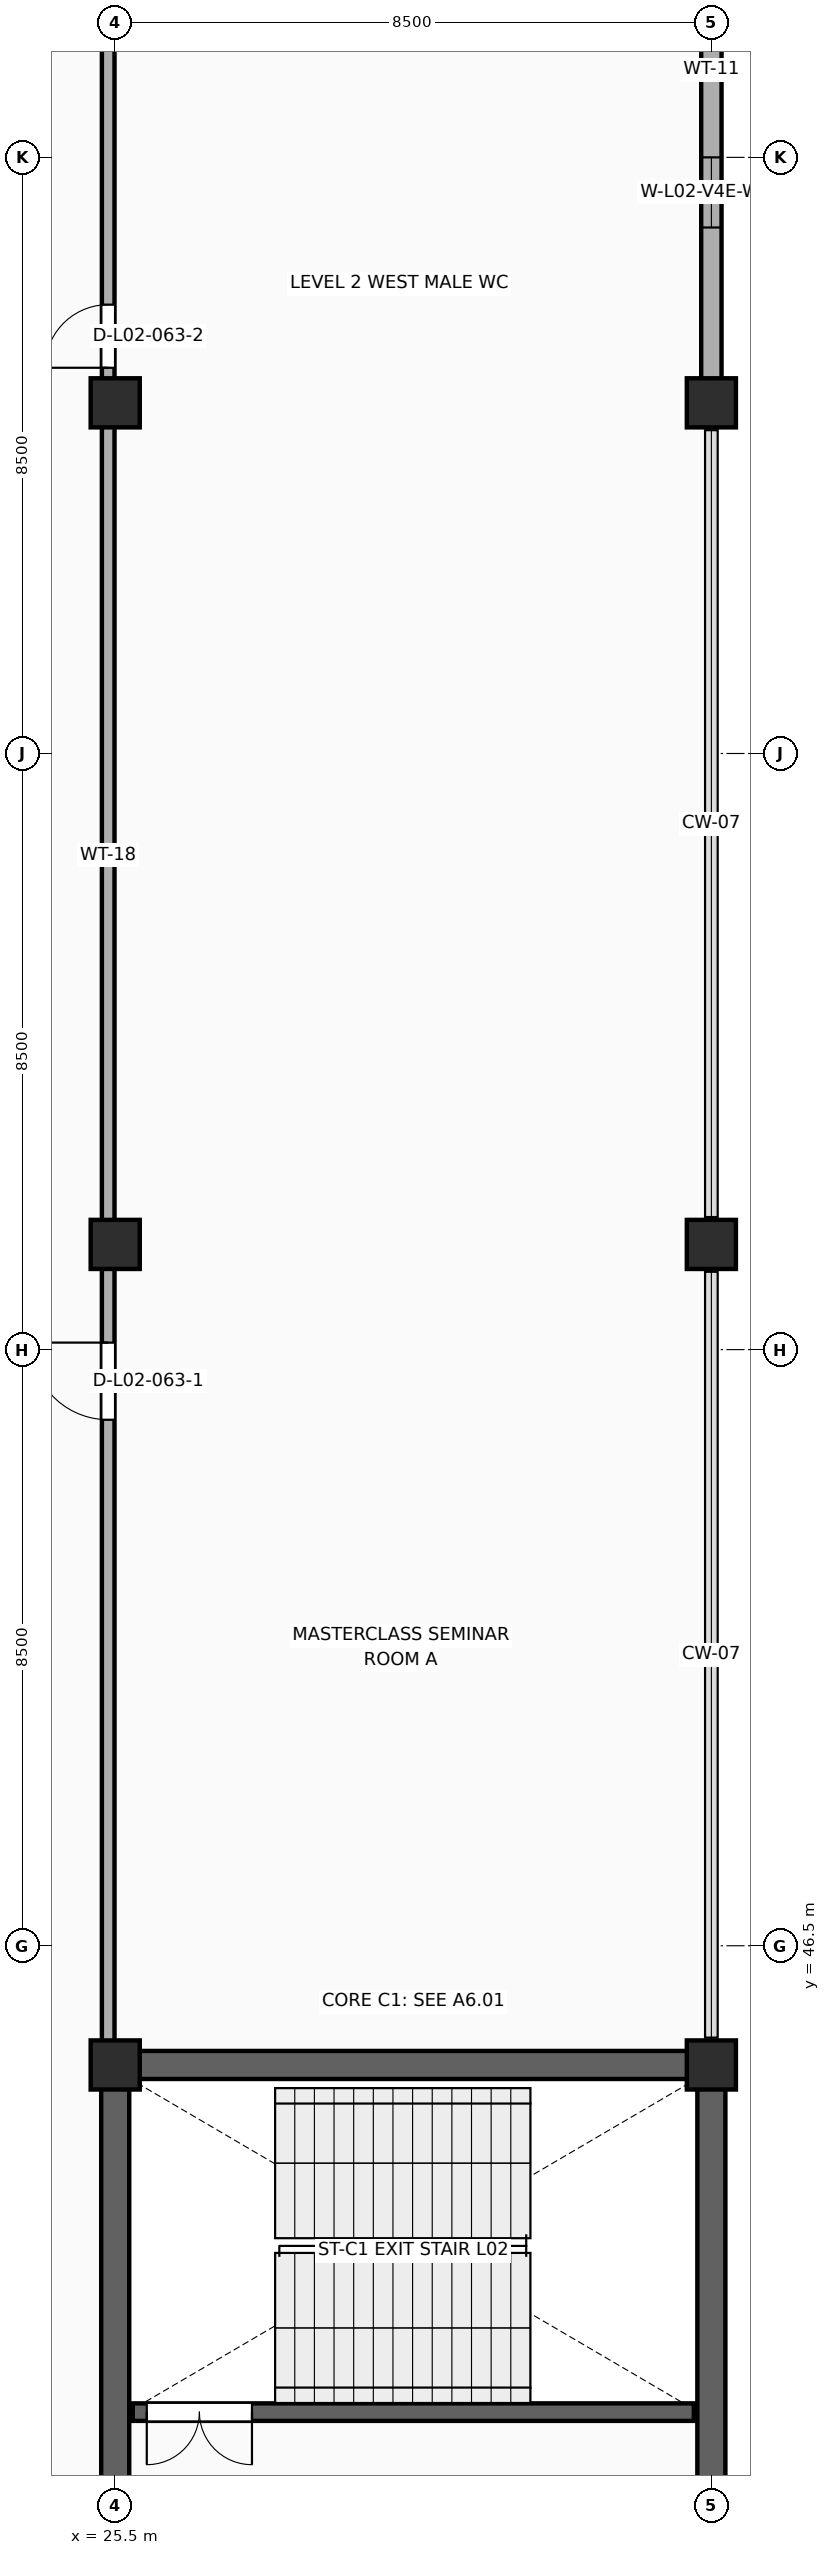
"""IFC4 building model, lengths in metres.
Left out: names, types, materials, properties, quantities, classifications, styles, units other than length and angle.
Written with IfcOpenShell. Run it as: python <this file> out.ifc"""

import sys

from ifc_helpers import new_model, si_unit, direction, frame, frame_2d, origin, origin_2d, place, context, subcontext, project, spatial, rectangle, extrude, element, fill, save


model = new_model("IFC4")
c1 = context("Model", 3, precision=1e-05, world=origin(), true_north=direction((0.0, 1.0)))
c2 = subcontext(c1, "Body", "Model", "MODEL_VIEW")
j1 = project(units=[si_unit("LENGTHUNIT", "METRE"), si_unit("PLANEANGLEUNIT", "RADIAN")], contexts=[c1])
p1 = place(None, origin())
s1 = spatial("IfcSite", under=j1, at=p1, CompositionType="ELEMENT")
p2 = place(p1, origin())
s2 = spatial("IfcBuilding", under=s1, at=p2, CompositionType="ELEMENT")
p3 = place(p2, frame((0.0, 0.0, 10.2)))
s3 = spatial("IfcBuildingStorey", under=s2, at=p3, CompositionType="ELEMENT", Elevation=10.2)
p4 = place(p3, frame((25.5, 32.0, 0.0), z_axis=(0.0, 0.0, 1.0), x_axis=(0.0, 1.0, 0.0)))
e1 = element("IfcWall", 1, at=p4, inside=s3, PredefinedType="SHEAR", context=c2, shape_type="SweptSolid", body=[
    extrude(rectangle(XDim=12.8, YDim=0.4, at=frame_2d((6.4, 0.0))), origin(), (0.0, 0.0, 1.0), 4.64),
])
p5 = place(p4, frame((1.25, 0.0, 0.0)))
e2 = element("IfcOpeningElement", 2, at=p5, cuts=e1, PredefinedType="OPENING", context=c2, shape_type="SweptSolid", body=[
    extrude(rectangle(XDim=1.05, YDim=2.15, at=frame_2d((0.525, 1.075))), frame((0.0, 0.212, 0.0), z_axis=(0.0, -1.0, 0.0), x_axis=(1.0, 0.0, 0.0)), (0.0, 0.0, 1.0), 0.424),
])
p6 = place(p3, frame((34.0, 32.0, 0.0), z_axis=(0.0, 0.0, 1.0), x_axis=(0.0, 1.0, 0.0)))
e3 = element("IfcWall", 3, at=p6, inside=s3, PredefinedType="SHEAR", context=c2, shape_type="SweptSolid", body=[
    extrude(rectangle(XDim=12.8, YDim=0.4, at=frame_2d((6.4, 0.0))), origin(), (0.0, 0.0, 1.0), 4.64),
])
p7 = place(p3, frame((25.7, 44.8, 0.0), z_axis=(0.0, 0.0, 1.0), x_axis=(1.0, 0.0, 0.0)))
e4 = element("IfcWall", 4, at=p7, inside=s3, PredefinedType="SHEAR", context=c2, shape_type="SweptSolid", body=[
    extrude(rectangle(XDim=8.1, YDim=0.4, at=frame_2d((4.05, 0.0))), origin(), (0.0, 0.0, 1.0), 4.64),
])
p8 = place(p3, frame((25.75, 39.85, 0.0), z_axis=(0.0, 0.0, 1.0), x_axis=(1.0, 0.0, 0.0)))
e5 = element("IfcWall", 5, at=p8, inside=s3, PredefinedType="STANDARD", context=c2, shape_type="SweptSolid", body=[
    extrude(rectangle(XDim=8.0, YDim=0.25, at=frame_2d((4.0, 0.0))), origin(), (0.0, 0.0, 1.0), 4.64),
])
p9 = place(p8, frame((0.2, 0.0, 0.0)))
e6 = element("IfcOpeningElement", 6, at=p9, cuts=e5, PredefinedType="OPENING", context=c2, shape_type="SweptSolid", body=[
    extrude(rectangle(XDim=1.5, YDim=2.2, at=frame_2d((0.75, 1.1))), frame((0.0, 0.137, 0.0), z_axis=(0.0, -1.0, 0.0), x_axis=(1.0, 0.0, 0.0)), (0.0, 0.0, 1.0), 0.274),
])
for number, where, z_axis, x_axis in (
    (7, (25.5, 44.8, 0.0), (0.0, 0.0, 1.0), (1.0, 0.0, 0.0)),
    (8, (25.5, 56.5, 0.0), (0.0, 0.0, 1.0), (1.0, 0.0, 0.0)),
    (9, (25.5, 68.5, 0.0), (0.0, 0.0, 1.0), (1.0, 0.0, 0.0)),
    (10, (34.0, 44.8, 0.0), (0.0, 0.0, 1.0), (1.0, 0.0, 0.0)),
    (11, (34.0, 56.5, 0.0), (0.0, 0.0, 1.0), (1.0, 0.0, 0.0)),
    (12, (34.0, 68.5, 0.0), (0.0, 0.0, 1.0), (1.0, 0.0, 0.0)),
):
    element("IfcColumn", number, at=place(p3, frame(where, z_axis=z_axis, x_axis=x_axis)), inside=s3, PredefinedType="COLUMN", context=c2, shape_type="SweptSolid", body=[
        extrude(rectangle(XDim=0.7, YDim=0.7, at=origin_2d()), origin(), (0.0, 0.0, 1.0), 4.54),
    ])
p10 = place(p3, frame((34.0, 68.5, 0.0), z_axis=(0.0, 0.0, 1.0), x_axis=(0.0, 1.0, 0.0)))
e13 = element("IfcWall", 13, at=p10, inside=s3, PredefinedType="STANDARD", context=c2, shape_type="SweptSolid", body=[
    extrude(rectangle(XDim=12.0, YDim=0.29, at=frame_2d((6.0, 0.0))), origin(), (0.0, 0.0, 1.0), 4.278),
])
p11 = place(p10, frame((2.5, 0.0, 1.1)))
e14 = element("IfcOpeningElement", 14, at=p11, cuts=e13, PredefinedType="OPENING", context=c2, shape_type="SweptSolid", body=[
    extrude(rectangle(XDim=1.0, YDim=1.5, at=frame_2d((0.5, 0.75))), frame((0.0, 0.157, 0.0), z_axis=(0.0, -1.0, 0.0), x_axis=(1.0, 0.0, 0.0)), (0.0, 0.0, 1.0), 0.314),
])
p12 = place(p3, frame((25.4, 45.0, 0.0), z_axis=(0.0, 0.0, 1.0), x_axis=(0.0, 1.0, 0.0)))
e15 = element("IfcWall", 15, at=p12, inside=s3, PredefinedType="PARTITIONING", context=c2, shape_type="SweptSolid", body=[
    extrude(rectangle(XDim=35.2, YDim=0.18, at=frame_2d((17.6, 0.0))), origin(), (0.0, 0.0, 1.0), 3.68),
])
p13 = place(p12, frame((9.0, 0.0, 0.0)))
e16 = element("IfcOpeningElement", 16, at=p13, cuts=e15, PredefinedType="OPENING", context=c2, shape_type="SweptSolid", body=[
    extrude(rectangle(XDim=1.1, YDim=2.15, at=frame_2d((0.55, 1.075))), frame((0.0, 0.102, 0.0), z_axis=(0.0, -1.0, 0.0), x_axis=(1.0, 0.0, 0.0)), (0.0, 0.0, 1.0), 0.204),
])
p14 = place(p12, frame((24.0, 0.0, 0.0)))
e17 = element("IfcOpeningElement", 17, at=p14, cuts=e15, PredefinedType="OPENING", context=c2, shape_type="SweptSolid", body=[
    extrude(rectangle(XDim=0.9, YDim=2.15, at=frame_2d((0.45, 1.075))), frame((0.0, 0.102, 0.0), z_axis=(0.0, -1.0, 0.0), x_axis=(1.0, 0.0, 0.0)), (0.0, 0.0, 1.0), 0.204),
])
p15 = place(p12, frame((28.8, 0.0, 0.0)))
e18 = element("IfcOpeningElement", 18, at=p15, cuts=e15, PredefinedType="OPENING", context=c2, shape_type="SweptSolid", body=[
    extrude(rectangle(XDim=0.9, YDim=2.15, at=frame_2d((0.45, 1.075))), frame((0.0, 0.102, 0.0), z_axis=(0.0, -1.0, 0.0), x_axis=(1.0, 0.0, 0.0)), (0.0, 0.0, 1.0), 0.204),
])
p16 = place(p12, frame((33.2, 0.0, 0.0)))
e19 = element("IfcOpeningElement", 19, at=p16, cuts=e15, PredefinedType="OPENING", context=c2, shape_type="SweptSolid", body=[
    extrude(rectangle(XDim=0.95, YDim=2.15, at=frame_2d((0.475, 1.075))), frame((0.0, 0.102, 0.0), z_axis=(0.0, -1.0, 0.0), x_axis=(1.0, 0.0, 0.0)), (0.0, 0.0, 1.0), 0.204),
])
p17 = place(p9, frame((1.5, 0.0, 0.0), z_axis=(0.0, 0.0, 1.0), x_axis=(-1.0, 0.0, 0.0)))
e20 = element("IfcDoor", 20, at=p17, inside=s3, OperationType="DOUBLE_DOOR_SINGLE_SWING", PredefinedType="DOOR", context=c2, shape_type="SweptSolid", body=[
    extrude(rectangle(XDim=1.5, YDim=2.2, at=frame_2d((0.75, 1.1))), frame((0.0, 0.025, 0.0), z_axis=(0.0, -1.0, 0.0), x_axis=(1.0, 0.0, 0.0)), (0.0, 0.0, 1.0), 0.05),
])
fill(e6, e20)
p18 = place(p11, origin())
e21 = element("IfcWindow", 21, at=p18, inside=s3, PartitioningType="SINGLE_PANEL", PredefinedType="WINDOW", context=c2, shape_type="SweptSolid", body=[
    extrude(rectangle(XDim=1.0, YDim=1.5, at=frame_2d((0.5, 0.75))), frame((0.0, 0.03, 0.0), z_axis=(0.0, -1.0, 0.0), x_axis=(1.0, 0.0, 0.0)), (0.0, 0.0, 1.0), 0.06),
])
fill(e14, e21)
p19 = place(p13, origin())
e22 = element("IfcDoor", 22, at=p19, inside=s3, OperationType="SINGLE_SWING_RIGHT", PredefinedType="DOOR", context=c2, shape_type="SweptSolid", body=[
    extrude(rectangle(XDim=1.1, YDim=2.15, at=frame_2d((0.55, 1.075))), frame((0.0, 0.025, 0.0), z_axis=(0.0, -1.0, 0.0), x_axis=(1.0, 0.0, 0.0)), (0.0, 0.0, 1.0), 0.05),
])
fill(e16, e22)
p20 = place(p14, origin())
e23 = element("IfcDoor", 23, at=p20, inside=s3, OperationType="SINGLE_SWING_LEFT", PredefinedType="DOOR", context=c2, shape_type="SweptSolid", body=[
    extrude(rectangle(XDim=0.9, YDim=2.15, at=frame_2d((0.45, 1.075))), frame((0.0, 0.025, 0.0), z_axis=(0.0, -1.0, 0.0), x_axis=(1.0, 0.0, 0.0)), (0.0, 0.0, 1.0), 0.05),
])
fill(e17, e23)
save(model, sys.argv[1])
